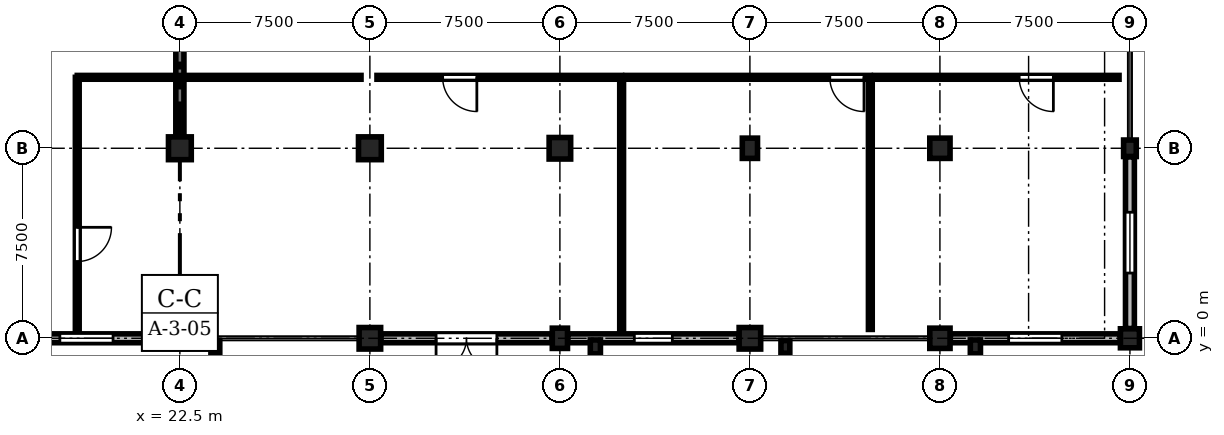
"""IFC4 building model, lengths in metres.
Left out: names, types, materials, properties, quantities, classifications, styles, units other than length and angle.
Written with IfcOpenShell. Run it as: python <this file> out.ifc"""

import sys

from ifc_helpers import new_model, si_unit, direction, frame, frame_2d, origin, origin_2d, place, context, subcontext, project, spatial, rectangle, extrude, element, fill, save


model = new_model("IFC4")
c1 = context("Model", 3, precision=1e-05, world=origin(), true_north=direction((0.0, 1.0)))
c2 = subcontext(c1, "Body", "Model", "MODEL_VIEW")
j1 = project(units=[si_unit("LENGTHUNIT", "METRE"), si_unit("PLANEANGLEUNIT", "RADIAN")], contexts=[c1])
p1 = place(None, origin())
s1 = spatial("IfcSite", under=j1, at=p1, CompositionType="ELEMENT")
p2 = place(p1, origin())
s2 = spatial("IfcBuilding", under=s1, at=p2, CompositionType="ELEMENT")
p3 = place(p2, origin())
s3 = spatial("IfcBuildingStorey", under=s2, at=p3, CompositionType="ELEMENT", Elevation=0.0)
p4 = place(p3, frame((22.5, 0.0, 0.0), z_axis=(0.0, 0.0, 1.0), x_axis=(1.0, 0.0, 0.0)))
e1 = element("IfcColumn", 1, at=p4, inside=s3, PredefinedType="COLUMN", context=c2, shape_type="SweptSolid", body=[
    extrude(rectangle(XDim=0.6, YDim=0.8, at=origin_2d()), origin(), (0.0, 0.0, 1.0), 4.8),
])
p5 = place(p3, frame((22.5, 7.5, 0.0), z_axis=(0.0, 0.0, 1.0), x_axis=(1.0, 0.0, 0.0)))
e2 = element("IfcColumn", 2, at=p5, inside=s3, PredefinedType="COLUMN", context=c2, shape_type="SweptSolid", body=[
    extrude(rectangle(XDim=0.9, YDim=0.9, at=origin_2d()), origin(), (0.0, 0.0, 1.0), 4.8),
])
p6 = place(p3, frame((30.0, 0.0, 0.0), z_axis=(0.0, 0.0, 1.0), x_axis=(1.0, 0.0, 0.0)))
e3 = element("IfcColumn", 3, at=p6, inside=s3, PredefinedType="COLUMN", context=c2, shape_type="SweptSolid", body=[
    extrude(rectangle(XDim=0.85, YDim=0.85, at=origin_2d()), origin(), (0.0, 0.0, 1.0), 4.8),
])
p7 = place(p3, frame((30.0, 7.5, 0.0), z_axis=(0.0, 0.0, 1.0), x_axis=(1.0, 0.0, 0.0)))
e4 = element("IfcColumn", 4, at=p7, inside=s3, PredefinedType="COLUMN", context=c2, shape_type="SweptSolid", body=[
    extrude(rectangle(XDim=0.9, YDim=0.9, at=origin_2d()), origin(), (0.0, 0.0, 1.0), 4.8),
])
p8 = place(p3, frame((37.5, 0.0, 0.0), z_axis=(0.0, 0.0, 1.0), x_axis=(1.0, 0.0, 0.0)))
e5 = element("IfcColumn", 5, at=p8, inside=s3, PredefinedType="COLUMN", context=c2, shape_type="SweptSolid", body=[
    extrude(rectangle(XDim=0.6, YDim=0.8, at=origin_2d()), origin(), (0.0, 0.0, 1.0), 4.8),
])
for number, where, z_axis, x_axis in (
    (6, (37.5, 7.5, 0.0), (0.0, 0.0, 1.0), (1.0, 0.0, 0.0)),
    (7, (45.0, 0.0, 0.0), (0.0, 0.0, 1.0), (1.0, 0.0, 0.0)),
):
    element("IfcColumn", number, at=place(p3, frame(where, z_axis=z_axis, x_axis=x_axis)), inside=s3, PredefinedType="COLUMN", context=c2, shape_type="SweptSolid", body=[
        extrude(rectangle(XDim=0.85, YDim=0.85, at=origin_2d()), origin(), (0.0, 0.0, 1.0), 4.8),
    ])
p9 = place(p3, frame((45.0, 7.5, 0.0), z_axis=(0.0, 0.0, 1.0), x_axis=(1.0, 0.0, 0.0)))
e8 = element("IfcColumn", 8, at=p9, inside=s3, PredefinedType="COLUMN", context=c2, shape_type="SweptSolid", body=[
    extrude(rectangle(XDim=0.6, YDim=0.8, at=origin_2d()), origin(), (0.0, 0.0, 1.0), 4.8),
])
for number, where, z_axis, x_axis in (
    (9, (52.5, 0.0, 0.0), (0.0, 0.0, 1.0), (1.0, 0.0, 0.0)),
    (10, (52.5, 7.5, 0.0), (0.0, 0.0, 1.0), (1.0, 0.0, 0.0)),
):
    element("IfcColumn", number, at=place(p3, frame(where, z_axis=z_axis, x_axis=x_axis)), inside=s3, PredefinedType="COLUMN", context=c2, shape_type="SweptSolid", body=[
        extrude(rectangle(XDim=0.8, YDim=0.8, at=origin_2d()), origin(), (0.0, 0.0, 1.0), 4.8),
    ])
p10 = place(p3, frame((60.0, 0.0, 0.0), z_axis=(0.0, 0.0, 1.0), x_axis=(1.0, 0.0, 0.0)))
e11 = element("IfcColumn", 11, at=p10, inside=s3, PredefinedType="COLUMN", context=c2, shape_type="SweptSolid", body=[
    extrude(rectangle(XDim=0.75, YDim=0.75, at=origin_2d()), origin(), (0.0, 0.0, 1.0), 4.8),
])
p11 = place(p3, frame((60.0, 7.5, 0.0), z_axis=(0.0, 0.0, 1.0), x_axis=(1.0, 0.0, 0.0)))
e12 = element("IfcColumn", 12, at=p11, inside=s3, PredefinedType="COLUMN", context=c2, shape_type="SweptSolid", body=[
    extrude(rectangle(XDim=0.5, YDim=0.65, at=origin_2d()), origin(), (0.0, 0.0, 1.0), 4.8),
])
p12 = place(p3, frame((23.9, -0.34, 0.0), z_axis=(0.0, 0.0, 1.0), x_axis=(1.0, 0.0, 0.0)))
e13 = element("IfcColumn", 13, at=p12, inside=s3, PredefinedType="PILASTER", context=c2, shape_type="SweptSolid", body=[
    extrude(rectangle(XDim=0.35, YDim=0.5, at=origin_2d()), origin(), (0.0, 0.0, 1.0), 4.1),
])
p13 = place(p3, frame((38.9, -0.34, 0.0), z_axis=(0.0, 0.0, 1.0), x_axis=(1.0, 0.0, 0.0)))
e14 = element("IfcColumn", 14, at=p13, inside=s3, PredefinedType="PILASTER", context=c2, shape_type="SweptSolid", body=[
    extrude(rectangle(XDim=0.4, YDim=0.55, at=origin_2d()), origin(), (0.0, 0.0, 1.0), 4.1),
])
p14 = place(p3, frame((46.4, -0.34, 0.0), z_axis=(0.0, 0.0, 1.0), x_axis=(1.0, 0.0, 0.0)))
e15 = element("IfcColumn", 15, at=p14, inside=s3, PredefinedType="PILASTER", context=c2, shape_type="SweptSolid", body=[
    extrude(rectangle(XDim=0.35, YDim=0.5, at=origin_2d()), origin(), (0.0, 0.0, 1.0), 4.1),
])
p15 = place(p3, frame((53.9, -0.34, 0.0), z_axis=(0.0, 0.0, 1.0), x_axis=(1.0, 0.0, 0.0)))
e16 = element("IfcColumn", 16, at=p15, inside=s3, PredefinedType="PILASTER", context=c2, shape_type="SweptSolid", body=[
    extrude(rectangle(XDim=0.4, YDim=0.55, at=origin_2d()), origin(), (0.0, 0.0, 1.0), 4.1),
])
p16 = place(p3, frame((22.5, 7.95, 0.0), z_axis=(0.0, 0.0, 1.0), x_axis=(0.0, 1.0, 0.0)))
e17 = element("IfcWall", 17, at=p16, inside=s3, PredefinedType="SHEAR", context=c2, shape_type="SweptSolid", body=[
    extrude(rectangle(XDim=6.6, YDim=0.32, at=frame_2d((3.3, 0.0))), origin(), (0.0, 0.0, 1.0), 3.95),
])
p17 = place(p3, frame((22.19, 0.0, 0.0), z_axis=(0.0, 0.0, 1.0), x_axis=(-1.0, 0.0, 0.0)))
e18 = element("IfcWall", 18, at=p17, inside=s3, PredefinedType="STANDARD", context=c2, shape_type="SweptSolid", body=[
    extrude(rectangle(XDim=6.755, YDim=0.35, at=frame_2d((3.377, 0.0))), origin(), (0.0, 0.0, 1.0), 3.95),
])
p18 = place(p17, frame((2.327, 0.0, 0.9)))
e19 = element("IfcOpeningElement", 19, at=p18, cuts=e18, PredefinedType="OPENING", context=c2, shape_type="SweptSolid", body=[
    extrude(rectangle(XDim=2.1, YDim=2.4, at=frame_2d((1.05, 1.2))), frame((0.0, 0.185, 0.0), z_axis=(0.0, -1.0, 0.0), x_axis=(1.0, 0.0, 0.0)), (0.0, 0.0, 1.0), 0.37),
])
p19 = place(p3, frame((37.19, 0.0, 0.0), z_axis=(0.0, 0.0, 1.0), x_axis=(-1.0, 0.0, 0.0)))
e20 = element("IfcWall", 20, at=p19, inside=s3, PredefinedType="STANDARD", context=c2, shape_type="SweptSolid", body=[
    extrude(rectangle(XDim=6.755, YDim=0.35, at=frame_2d((3.377, 0.0))), origin(), (0.0, 0.0, 1.0), 3.95),
])
p20 = place(p19, frame((2.177, 0.0, 0.0)))
e21 = element("IfcOpeningElement", 21, at=p20, cuts=e20, PredefinedType="OPENING", context=c2, shape_type="SweptSolid", body=[
    extrude(rectangle(XDim=2.4, YDim=2.7, at=frame_2d((1.2, 1.35))), frame((0.0, 0.185, 0.0), z_axis=(0.0, -1.0, 0.0), x_axis=(1.0, 0.0, 0.0)), (0.0, 0.0, 1.0), 0.37),
])
p21 = place(p3, frame((44.565, 0.0, 0.0), z_axis=(0.0, 0.0, 1.0), x_axis=(-1.0, 0.0, 0.0)))
e22 = element("IfcWall", 22, at=p21, inside=s3, PredefinedType="STANDARD", context=c2, shape_type="SweptSolid", body=[
    extrude(rectangle(XDim=6.755, YDim=0.35, at=frame_2d((3.377, 0.0))), origin(), (0.0, 0.0, 1.0), 3.95),
])
p22 = place(p21, frame((2.627, 0.0, 0.9)))
e23 = element("IfcOpeningElement", 23, at=p22, cuts=e22, PredefinedType="OPENING", context=c2, shape_type="SweptSolid", body=[
    extrude(rectangle(XDim=1.5, YDim=2.1, at=frame_2d((0.75, 1.05))), frame((0.0, 0.185, 0.0), z_axis=(0.0, -1.0, 0.0), x_axis=(1.0, 0.0, 0.0)), (0.0, 0.0, 1.0), 0.37),
])
p23 = place(p3, frame((59.615, 0.0, 0.0), z_axis=(0.0, 0.0, 1.0), x_axis=(-1.0, 0.0, 0.0)))
e24 = element("IfcWall", 24, at=p23, inside=s3, PredefinedType="STANDARD", context=c2, shape_type="SweptSolid", body=[
    extrude(rectangle(XDim=6.705, YDim=0.35, at=frame_2d((3.353, 0.0))), origin(), (0.0, 0.0, 1.0), 3.95),
])
p24 = place(p23, frame((2.302, 0.0, 0.9)))
e25 = element("IfcOpeningElement", 25, at=p24, cuts=e24, PredefinedType="OPENING", context=c2, shape_type="SweptSolid", body=[
    extrude(rectangle(XDim=2.1, YDim=2.1, at=frame_2d((1.05, 1.05))), frame((0.0, 0.185, 0.0), z_axis=(0.0, -1.0, 0.0), x_axis=(1.0, 0.0, 0.0)), (0.0, 0.0, 1.0), 0.37),
])
p25 = place(p3, frame((60.0, 7.165, 0.0), z_axis=(0.0, 0.0, 1.0), x_axis=(0.0, -1.0, 0.0)))
e26 = element("IfcWall", 26, at=p25, inside=s3, PredefinedType="STANDARD", context=c2, shape_type="SweptSolid", body=[
    extrude(rectangle(XDim=6.78, YDim=0.35, at=frame_2d((3.39, 0.0))), origin(), (0.0, 0.0, 1.0), 3.9),
])
p26 = place(p25, frame((2.19, 0.0, 0.9)))
e27 = element("IfcOpeningElement", 27, at=p26, cuts=e26, PredefinedType="OPENING", context=c2, shape_type="SweptSolid", body=[
    extrude(rectangle(XDim=2.4, YDim=2.1, at=frame_2d((1.2, 1.05))), frame((0.0, 0.185, 0.0), z_axis=(0.0, -1.0, 0.0), x_axis=(1.0, 0.0, 0.0)), (0.0, 0.0, 1.0), 0.37),
])
p27 = place(p3, frame((18.45, 10.3, 0.0), z_axis=(0.0, 0.0, 1.0), x_axis=(0.0, -1.0, 0.0)))
e28 = element("IfcWall", 28, at=p27, inside=s3, PredefinedType="PARTITIONING", context=c2, shape_type="SweptSolid", body=[
    extrude(rectangle(XDim=9.95, YDim=0.15, at=frame_2d((4.975, 0.0))), origin(), (0.0, 0.0, 1.0), 4.485),
])
p28 = place(p27, frame((5.92, 0.0, 0.0)))
e29 = element("IfcOpeningElement", 29, at=p28, cuts=e28, PredefinedType="OPENING", context=c2, shape_type="SweptSolid", body=[
    extrude(rectangle(XDim=1.35, YDim=2.25, at=frame_2d((0.675, 1.125))), frame((0.0, 0.085, 0.0), z_axis=(0.0, -1.0, 0.0), x_axis=(1.0, 0.0, 0.0)), (0.0, 0.0, 1.0), 0.17),
])
p29 = place(p3, frame((39.937, 10.3, 0.0), z_axis=(0.0, 0.0, 1.0), x_axis=(-1.0, 0.0, 0.0)))
e30 = element("IfcWall", 30, at=p29, inside=s3, PredefinedType="PARTITIONING", context=c2, shape_type="SweptSolid", body=[
    extrude(rectangle(XDim=9.657, YDim=0.15, at=frame_2d((4.828, 0.0))), origin(), (0.0, 0.0, 1.0), 4.485),
])
p30 = place(p29, frame((5.715, 0.0, 0.0)))
e31 = element("IfcOpeningElement", 31, at=p30, cuts=e30, PredefinedType="OPENING", context=c2, shape_type="SweptSolid", body=[
    extrude(rectangle(XDim=1.35, YDim=2.25, at=frame_2d((0.675, 1.125))), frame((0.0, 0.085, 0.0), z_axis=(0.0, -1.0, 0.0), x_axis=(1.0, 0.0, 0.0)), (0.0, 0.0, 1.0), 0.17),
])
p31 = place(p3, frame((49.753, 10.3, 0.0), z_axis=(0.0, 0.0, 1.0), x_axis=(-1.0, 0.0, 0.0)))
e32 = element("IfcWall", 32, at=p31, inside=s3, PredefinedType="PARTITIONING", context=c2, shape_type="SweptSolid", body=[
    extrude(rectangle(XDim=9.657, YDim=0.15, at=frame_2d((4.828, 0.0))), origin(), (0.0, 0.0, 1.0), 4.485),
])
p32 = place(p31, frame((0.25, 0.0, 0.0)))
e33 = element("IfcOpeningElement", 33, at=p32, cuts=e32, PredefinedType="OPENING", context=c2, shape_type="SweptSolid", body=[
    extrude(rectangle(XDim=1.35, YDim=2.25, at=frame_2d((0.675, 1.125))), frame((0.0, 0.085, 0.0), z_axis=(0.0, -1.0, 0.0), x_axis=(1.0, 0.0, 0.0)), (0.0, 0.0, 1.0), 0.17),
])
p33 = place(p3, frame((59.57, 10.3, 0.0), z_axis=(0.0, 0.0, 1.0), x_axis=(-1.0, 0.0, 0.0)))
e34 = element("IfcWall", 34, at=p33, inside=s3, PredefinedType="PARTITIONING", context=c2, shape_type="SweptSolid", body=[
    extrude(rectangle(XDim=9.657, YDim=0.15, at=frame_2d((4.828, 0.0))), origin(), (0.0, 0.0, 1.0), 4.485),
])
p34 = place(p33, frame((2.592, 0.0, 0.0)))
e35 = element("IfcOpeningElement", 35, at=p34, cuts=e34, PredefinedType="OPENING", context=c2, shape_type="SweptSolid", body=[
    extrude(rectangle(XDim=1.35, YDim=2.25, at=frame_2d((0.675, 1.125))), frame((0.0, 0.085, 0.0), z_axis=(0.0, -1.0, 0.0), x_axis=(1.0, 0.0, 0.0)), (0.0, 0.0, 1.0), 0.17),
])
p35 = place(p3, frame((18.45, 10.3, 0.0), z_axis=(0.0, 0.0, 1.0), x_axis=(1.0, 0.0, 0.0)))
e36 = element("IfcWall", 36, at=p35, inside=s3, PredefinedType="PARTITIONING", context=c2, shape_type="SweptSolid", body=[
    extrude(rectangle(XDim=11.2, YDim=0.15, at=frame_2d((5.6, 0.0))), origin(), (0.0, 0.0, 1.0), 4.485),
])
for number, where, z_axis, x_axis in (
    (37, (39.937, 0.35, 0.0), (0.0, 0.0, 1.0), (0.0, 1.0, 0.0)),
    (38, (49.753, 0.35, 0.0), (0.0, 0.0, 1.0), (0.0, 1.0, 0.0)),
):
    element("IfcWall", number, at=place(p3, frame(where, z_axis=z_axis, x_axis=x_axis)), inside=s3, PredefinedType="PARTITIONING", context=c2, shape_type="SweptSolid", body=[
        extrude(rectangle(XDim=9.95, YDim=0.15, at=frame_2d((4.975, 0.0))), origin(), (0.0, 0.0, 1.0), 4.485),
    ])
p36 = place(p18, origin())
e39 = element("IfcWindow", 39, at=p36, inside=s3, PartitioningType="SINGLE_PANEL", PredefinedType="WINDOW", context=c2, shape_type="SweptSolid", body=[
    extrude(rectangle(XDim=2.1, YDim=2.4, at=frame_2d((1.05, 1.2))), frame((0.0, 0.03, 0.0), z_axis=(0.0, -1.0, 0.0), x_axis=(1.0, 0.0, 0.0)), (0.0, 0.0, 1.0), 0.06),
])
fill(e19, e39)
p37 = place(p20, origin())
e40 = element("IfcDoor", 40, at=p37, inside=s3, OperationType="DOUBLE_DOOR_SINGLE_SWING", PredefinedType="DOOR", context=c2, shape_type="SweptSolid", body=[
    extrude(rectangle(XDim=2.4, YDim=2.7, at=frame_2d((1.2, 1.35))), frame((0.0, 0.025, 0.0), z_axis=(0.0, -1.0, 0.0), x_axis=(1.0, 0.0, 0.0)), (0.0, 0.0, 1.0), 0.05),
])
fill(e21, e40)
p38 = place(p22, origin())
e41 = element("IfcWindow", 41, at=p38, inside=s3, PartitioningType="SINGLE_PANEL", PredefinedType="WINDOW", context=c2, shape_type="SweptSolid", body=[
    extrude(rectangle(XDim=1.5, YDim=2.1, at=frame_2d((0.75, 1.05))), frame((0.0, 0.03, 0.0), z_axis=(0.0, -1.0, 0.0), x_axis=(1.0, 0.0, 0.0)), (0.0, 0.0, 1.0), 0.06),
])
fill(e23, e41)
p39 = place(p24, origin())
e42 = element("IfcWindow", 42, at=p39, inside=s3, PartitioningType="SINGLE_PANEL", PredefinedType="WINDOW", context=c2, shape_type="SweptSolid", body=[
    extrude(rectangle(XDim=2.1, YDim=2.1, at=frame_2d((1.05, 1.05))), frame((0.0, 0.03, 0.0), z_axis=(0.0, -1.0, 0.0), x_axis=(1.0, 0.0, 0.0)), (0.0, 0.0, 1.0), 0.06),
])
fill(e25, e42)
p40 = place(p26, origin())
e43 = element("IfcWindow", 43, at=p40, inside=s3, PartitioningType="SINGLE_PANEL", PredefinedType="WINDOW", context=c2, shape_type="SweptSolid", body=[
    extrude(rectangle(XDim=2.4, YDim=2.1, at=frame_2d((1.2, 1.05))), frame((0.0, 0.03, 0.0), z_axis=(0.0, -1.0, 0.0), x_axis=(1.0, 0.0, 0.0)), (0.0, 0.0, 1.0), 0.06),
])
fill(e27, e43)
p41 = place(p28, origin())
e44 = element("IfcDoor", 44, at=p41, inside=s3, OperationType="SINGLE_SWING_LEFT", PredefinedType="DOOR", context=c2, shape_type="SweptSolid", body=[
    extrude(rectangle(XDim=1.35, YDim=2.25, at=frame_2d((0.675, 1.125))), frame((0.0, 0.025, 0.0), z_axis=(0.0, -1.0, 0.0), x_axis=(1.0, 0.0, 0.0)), (0.0, 0.0, 1.0), 0.05),
])
fill(e29, e44)
p42 = place(p30, origin())
e45 = element("IfcDoor", 45, at=p42, inside=s3, OperationType="SINGLE_SWING_LEFT", PredefinedType="DOOR", context=c2, shape_type="SweptSolid", body=[
    extrude(rectangle(XDim=1.35, YDim=2.25, at=frame_2d((0.675, 1.125))), frame((0.0, 0.025, 0.0), z_axis=(0.0, -1.0, 0.0), x_axis=(1.0, 0.0, 0.0)), (0.0, 0.0, 1.0), 0.05),
])
fill(e31, e45)
p43 = place(p32, origin())
e46 = element("IfcDoor", 46, at=p43, inside=s3, OperationType="SINGLE_SWING_LEFT", PredefinedType="DOOR", context=c2, shape_type="SweptSolid", body=[
    extrude(rectangle(XDim=1.35, YDim=2.25, at=frame_2d((0.675, 1.125))), frame((0.0, 0.025, 0.0), z_axis=(0.0, -1.0, 0.0), x_axis=(1.0, 0.0, 0.0)), (0.0, 0.0, 1.0), 0.05),
])
fill(e33, e46)
p44 = place(p34, origin())
e47 = element("IfcDoor", 47, at=p44, inside=s3, OperationType="SINGLE_SWING_LEFT", PredefinedType="DOOR", context=c2, shape_type="SweptSolid", body=[
    extrude(rectangle(XDim=1.35, YDim=2.25, at=frame_2d((0.675, 1.125))), frame((0.0, 0.025, 0.0), z_axis=(0.0, -1.0, 0.0), x_axis=(1.0, 0.0, 0.0)), (0.0, 0.0, 1.0), 0.05),
])
fill(e35, e47)
save(model, sys.argv[1])
